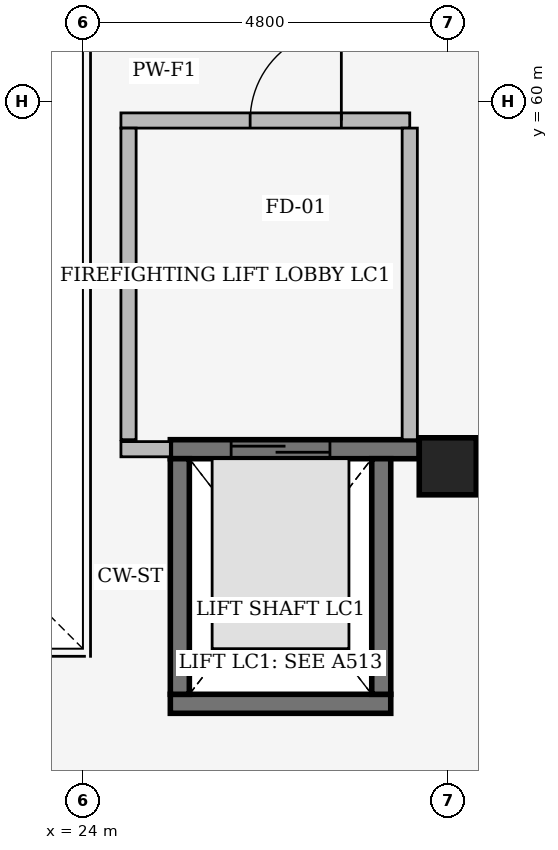
"""IFC4 building model, lengths in metres.
Left out: names, types, materials, properties, quantities, classifications, styles, units other than length and angle.
Written with IfcOpenShell. Run it as: python <this file> out.ifc"""

import sys

from ifc_helpers import new_model, si_unit, direction, frame, frame_2d, origin, origin_2d, place, context, subcontext, project, spatial, rectangle, extrude, element, fill, save


model = new_model("IFC4")
c1 = context("Model", 3, precision=1e-05, world=origin(), true_north=direction((0.0, 1.0)))
c2 = subcontext(c1, "Body", "Model", "MODEL_VIEW")
j1 = project(units=[si_unit("LENGTHUNIT", "METRE"), si_unit("PLANEANGLEUNIT", "RADIAN")], contexts=[c1])
p1 = place(None, origin())
s1 = spatial("IfcSite", under=j1, at=p1, CompositionType="ELEMENT")
p2 = place(p1, origin())
s2 = spatial("IfcBuilding", under=s1, at=p2, CompositionType="ELEMENT")
p3 = place(p2, frame((0.0, 0.0, 15.3)))
s3 = spatial("IfcBuildingStorey", under=s2, at=p3, CompositionType="ELEMENT", Elevation=15.3)
p4 = place(p3, frame((28.8, 55.2, 0.0), z_axis=(0.0, 0.0, 1.0), x_axis=(1.0, 0.0, 0.0)))
e1 = element("IfcColumn", 1, at=p4, inside=s3, PredefinedType="COLUMN", context=c2, shape_type="SweptSolid", body=[
    extrude(rectangle(XDim=0.75, YDim=0.75, at=origin_2d()), origin(), (0.0, 0.0, 1.0), 4.5),
])
p5 = place(p3, frame((25.15, 52.075, 0.0), z_axis=(0.0, 0.0, 1.0), x_axis=(1.0, 0.0, 0.0)))
e2 = element("IfcWall", 2, at=p5, inside=s3, PredefinedType="SHEAR", context=c2, shape_type="SweptSolid", body=[
    extrude(rectangle(XDim=2.9, YDim=0.25, at=frame_2d((1.45, 0.0))), origin(), (0.0, 0.0, 1.0), 4.22),
])
p6 = place(p3, frame((25.15, 55.425, 0.0), z_axis=(0.0, 0.0, 1.0), x_axis=(1.0, 0.0, 0.0)))
e3 = element("IfcWall", 3, at=p6, inside=s3, PredefinedType="SHEAR", context=c2, shape_type="SweptSolid", body=[
    extrude(rectangle(XDim=3.275, YDim=0.25, at=frame_2d((1.638, 0.0))), origin(), (0.0, 0.0, 1.0), 4.22),
])
p7 = place(p6, frame((0.8, 0.0, 0.0)))
e4 = element("IfcOpeningElement", 4, at=p7, cuts=e3, PredefinedType="OPENING", context=c2, shape_type="SweptSolid", body=[
    extrude(rectangle(XDim=1.3, YDim=2.2, at=frame_2d((0.65, 1.1))), frame((0.0, 0.135, 0.0), z_axis=(0.0, -1.0, 0.0), x_axis=(1.0, 0.0, 0.0)), (0.0, 0.0, 1.0), 0.27),
])
for number, where, z_axis, x_axis in (
    (5, (25.275, 52.2, 0.0), (0.0, 0.0, 1.0), (0.0, 1.0, 0.0)),
    (6, (27.925, 52.2, 0.0), (0.0, 0.0, 1.0), (0.0, 1.0, 0.0)),
):
    element("IfcWall", number, at=place(p3, frame(where, z_axis=z_axis, x_axis=x_axis)), inside=s3, PredefinedType="SHEAR", context=c2, shape_type="SweptSolid", body=[
        extrude(rectangle(XDim=3.1, YDim=0.25, at=frame_2d((1.55, 0.0))), origin(), (0.0, 0.0, 1.0), 4.22),
    ])
p8 = place(p3, frame((24.5, 59.75, 0.0), z_axis=(0.0, 0.0, 1.0), x_axis=(1.0, 0.0, 0.0)))
e7 = element("IfcWall", 7, at=p8, inside=s3, PredefinedType="PARTITIONING", context=c2, shape_type="SweptSolid", body=[
    extrude(rectangle(XDim=3.8, YDim=0.2, at=frame_2d((1.9, 0.0))), origin(), (0.0, 0.0, 1.0), 4.14),
])
p9 = place(p8, frame((1.7, 0.0, 0.0)))
e8 = element("IfcOpeningElement", 8, at=p9, cuts=e7, PredefinedType="OPENING", context=c2, shape_type="SweptSolid", body=[
    extrude(rectangle(XDim=1.2, YDim=2.2, at=frame_2d((0.6, 1.1))), frame((0.0, 0.11, 0.0), z_axis=(0.0, -1.0, 0.0), x_axis=(1.0, 0.0, 0.0)), (0.0, 0.0, 1.0), 0.22),
])
for number, where, z_axis, x_axis in (
    (9, (24.6, 55.55, 0.0), (0.0, 0.0, 1.0), (0.0, 1.0, 0.0)),
    (10, (28.3, 55.55, 0.0), (0.0, 0.0, 1.0), (0.0, 1.0, 0.0)),
):
    element("IfcWall", number, at=place(p3, frame(where, z_axis=z_axis, x_axis=x_axis)), inside=s3, PredefinedType="PARTITIONING", context=c2, shape_type="SweptSolid", body=[
        extrude(rectangle(XDim=4.1, YDim=0.2, at=frame_2d((2.05, 0.0))), origin(), (0.0, 0.0, 1.0), 4.14),
    ])
p10 = place(p3, frame((24.5, 55.425, 0.0), z_axis=(0.0, 0.0, 1.0), x_axis=(1.0, 0.0, 0.0)))
e11 = element("IfcWall", 11, at=p10, inside=s3, PredefinedType="PARTITIONING", context=c2, shape_type="SweptSolid", body=[
    extrude(rectangle(XDim=0.65, YDim=0.2, at=frame_2d((0.325, 0.0))), origin(), (0.0, 0.0, 1.0), 4.14),
])
p11 = place(p7, origin())
e12 = element("IfcDoor", 12, at=p11, inside=s3, OperationType="DOUBLE_DOOR_SLIDING", PredefinedType="DOOR", context=c2, shape_type="SweptSolid", body=[
    extrude(rectangle(XDim=1.3, YDim=2.2, at=frame_2d((0.65, 1.1))), frame((0.0, 0.025, 0.0), z_axis=(0.0, -1.0, 0.0), x_axis=(1.0, 0.0, 0.0)), (0.0, 0.0, 1.0), 0.05),
])
fill(e4, e12)
p12 = place(p9, origin())
e13 = element("IfcDoor", 13, at=p12, inside=s3, OperationType="SINGLE_SWING_RIGHT", PredefinedType="DOOR", context=c2, shape_type="SweptSolid", body=[
    extrude(rectangle(XDim=1.2, YDim=2.2, at=frame_2d((0.6, 1.1))), frame((0.0, 0.025, 0.0), z_axis=(0.0, -1.0, 0.0), x_axis=(1.0, 0.0, 0.0)), (0.0, 0.0, 1.0), 0.05),
])
fill(e8, e13)
save(model, sys.argv[1])
